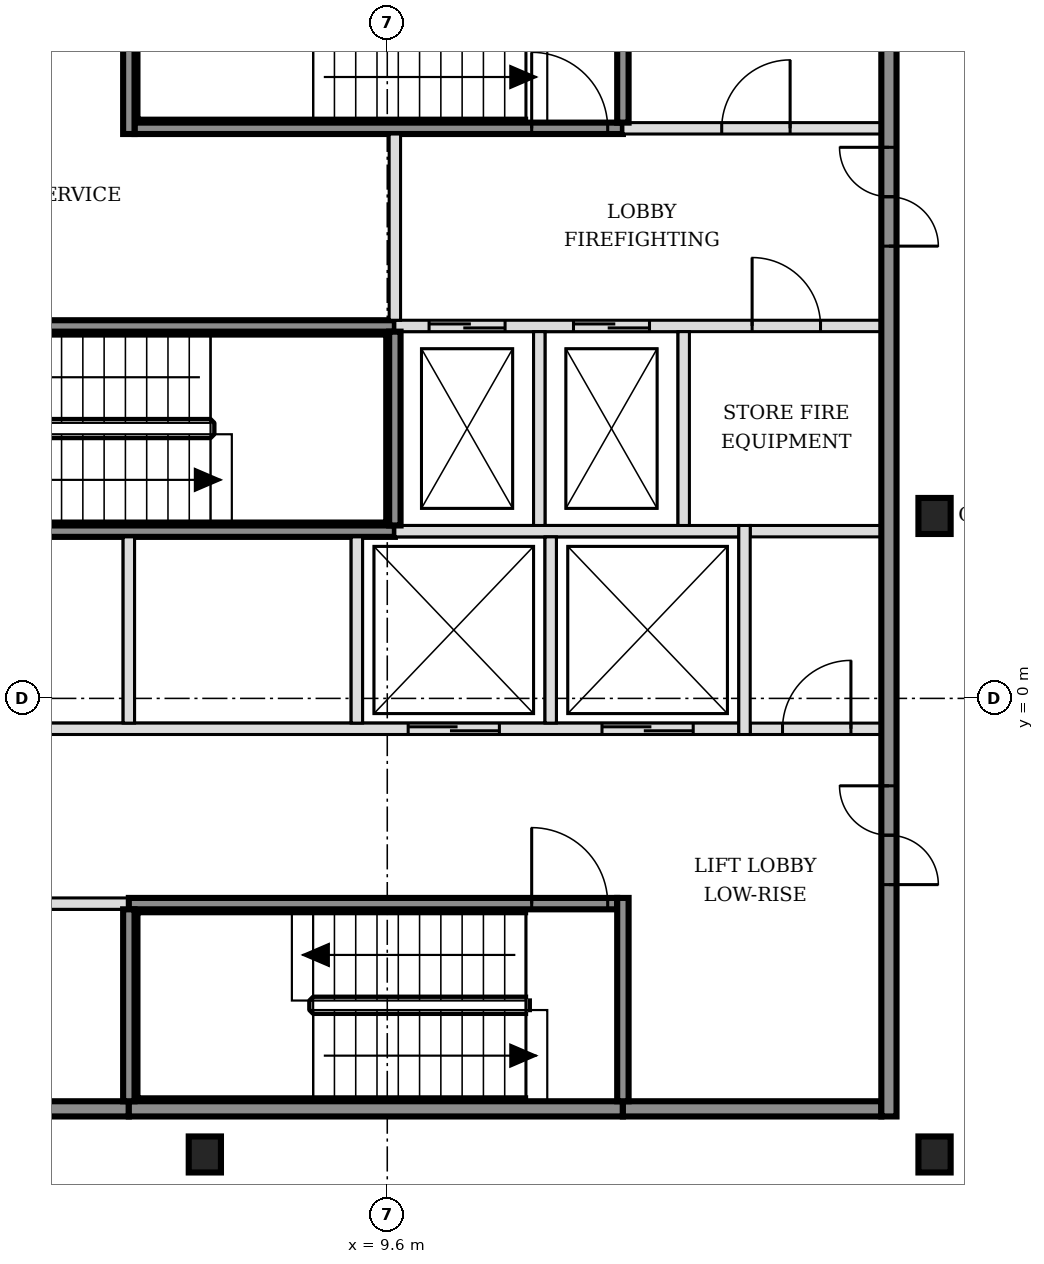
"""IFC4 building model, lengths in metres.
Left out: names, types, materials, properties, quantities, classifications, styles, units other than length and angle.
Written with IfcOpenShell. Run it as: python <this file> out.ifc"""

import sys

from ifc_helpers import new_model, si_unit, direction, frame, frame_2d, origin, origin_2d, place, context, subcontext, project, spatial, rectangle, i_section, extrude, element, fill, save


model = new_model("IFC4")
c1 = context("Model", 3, precision=1e-05, world=origin(), true_north=direction((0.0, 1.0)))
c2 = subcontext(c1, "Body", "Model", "MODEL_VIEW")
j1 = project(units=[si_unit("LENGTHUNIT", "METRE"), si_unit("PLANEANGLEUNIT", "RADIAN")], contexts=[c1])
p1 = place(None, origin())
s1 = spatial("IfcSite", under=j1, at=p1, CompositionType="ELEMENT")
p2 = place(p1, origin())
s2 = spatial("IfcBuilding", under=s1, at=p2, CompositionType="ELEMENT")
p3 = place(p2, frame((0.0, 0.0, 112.2)))
s3 = spatial("IfcBuildingStorey", under=s2, at=p3, CompositionType="ELEMENT", Elevation=112.2)
for number, where, z_axis, x_axis in (
    (1, (7.2, -6.0, -0.15), (0.0, 0.0, 1.0), (1.0, 0.0, 0.0)),
    (2, (16.8, -6.0, -0.15), (0.0, 0.0, 1.0), (1.0, 0.0, 0.0)),
    (3, (16.8, 2.4, -0.15), (0.0, 0.0, 1.0), (1.0, 0.0, 0.0)),
):
    element("IfcColumn", number, at=place(p3, frame(where, z_axis=z_axis, x_axis=x_axis)), inside=s3, PredefinedType="COLUMN", context=c2, shape_type="SweptSolid", body=[
        extrude(i_section(OverallWidth=0.424, OverallDepth=0.474, WebThickness=0.048, FlangeThickness=0.077, FilletRadius=0.015, at=origin_2d()), origin(), (0.0, 0.0, 1.0), 3.6),
    ])
p4 = place(p3, frame((-1.7, -5.4, 0.0), z_axis=(0.0, 0.0, 1.0), x_axis=(1.0, 0.0, 0.0)))
e4 = element("IfcWall", 4, at=p4, inside=s3, PredefinedType="SOLIDWALL", context=c2, shape_type="SweptSolid", body=[
    extrude(rectangle(XDim=7.9, YDim=0.2, at=frame_2d((3.95, 0.0))), origin(), (0.0, 0.0, 1.0), 3.45),
])
p5 = place(p3, frame((6.2, -5.4, 0.0), z_axis=(0.0, 0.0, 1.0), x_axis=(1.0, 0.0, 0.0)))
e5 = element("IfcWall", 5, at=p5, inside=s3, PredefinedType="SOLIDWALL", context=c2, shape_type="SweptSolid", body=[
    extrude(rectangle(XDim=6.5, YDim=0.2, at=frame_2d((3.25, 0.0))), origin(), (0.0, 0.0, 1.0), 3.45),
])
p6 = place(p3, frame((12.7, -5.4, 0.0), z_axis=(0.0, 0.0, 1.0), x_axis=(1.0, 0.0, 0.0)))
e6 = element("IfcWall", 6, at=p6, inside=s3, PredefinedType="SOLIDWALL", context=c2, shape_type="SweptSolid", body=[
    extrude(rectangle(XDim=3.4, YDim=0.2, at=frame_2d((1.7, 0.0))), origin(), (0.0, 0.0, 1.0), 3.45),
])
p7 = place(p3, frame((-1.7, -2.7, 0.0), z_axis=(0.0, 0.0, 1.0), x_axis=(1.0, 0.0, 0.0)))
e7 = element("IfcWall", 7, at=p7, inside=s3, PredefinedType="SOLIDWALL", context=c2, shape_type="SweptSolid", body=[
    extrude(rectangle(XDim=7.9, YDim=0.15, at=frame_2d((3.95, 0.0))), origin(), (0.0, 0.0, 1.0), 3.45),
])
p8 = place(p7, frame((0.6, 0.0, 0.0)))
e8 = element("IfcOpeningElement", 8, at=p8, cuts=e7, PredefinedType="OPENING", context=c2, shape_type="SweptSolid", body=[
    extrude(rectangle(XDim=1.1, YDim=2.1, at=frame_2d((0.55, 1.05))), frame((0.0, 0.085, 0.0), z_axis=(0.0, -1.0, 0.0), x_axis=(1.0, 0.0, 0.0)), (0.0, 0.0, 1.0), 0.17),
])
p9 = place(p7, frame((3.1, 0.0, 0.0)))
e9 = element("IfcOpeningElement", 9, at=p9, cuts=e7, PredefinedType="OPENING", context=c2, shape_type="SweptSolid", body=[
    extrude(rectangle(XDim=1.1, YDim=2.1, at=frame_2d((0.55, 1.05))), frame((0.0, 0.085, 0.0), z_axis=(0.0, -1.0, 0.0), x_axis=(1.0, 0.0, 0.0)), (0.0, 0.0, 1.0), 0.17),
])
p10 = place(p3, frame((6.2, -2.7, 0.0), z_axis=(0.0, 0.0, 1.0), x_axis=(1.0, 0.0, 0.0)))
e10 = element("IfcWall", 10, at=p10, inside=s3, PredefinedType="SOLIDWALL", context=c2, shape_type="SweptSolid", body=[
    extrude(rectangle(XDim=6.425, YDim=0.15, at=frame_2d((3.212, 0.0))), origin(), (0.0, 0.0, 1.0), 3.45),
])
p11 = place(p10, frame((5.3, 0.0, 0.0)))
e11 = element("IfcOpeningElement", 11, at=p11, cuts=e10, PredefinedType="OPENING", context=c2, shape_type="SweptSolid", body=[
    extrude(rectangle(XDim=1.0, YDim=2.1, at=frame_2d((0.5, 1.05))), frame((0.0, 0.085, 0.0), z_axis=(0.0, -1.0, 0.0), x_axis=(1.0, 0.0, 0.0)), (0.0, 0.0, 1.0), 0.17),
])
p12 = place(p3, frame((-1.7, -0.4, 0.0), z_axis=(0.0, 0.0, 1.0), x_axis=(1.0, 0.0, 0.0)))
e12 = element("IfcWall", 12, at=p12, inside=s3, PredefinedType="SOLIDWALL", context=c2, shape_type="SweptSolid", body=[
    extrude(rectangle(XDim=15.925, YDim=0.15, at=frame_2d((7.962, 0.0))), origin(), (0.0, 0.0, 1.0), 3.45),
])
p13 = place(p12, frame((0.6, 0.0, 0.0)))
e13 = element("IfcOpeningElement", 13, at=p13, cuts=e12, PredefinedType="OPENING", context=c2, shape_type="SweptSolid", body=[
    extrude(rectangle(XDim=1.1, YDim=2.1, at=frame_2d((0.55, 1.05))), frame((0.0, 0.085, 0.0), z_axis=(0.0, -1.0, 0.0), x_axis=(1.0, 0.0, 0.0)), (0.0, 0.0, 1.0), 0.17),
])
p14 = place(p12, frame((3.1, 0.0, 0.0)))
e14 = element("IfcOpeningElement", 14, at=p14, cuts=e12, PredefinedType="OPENING", context=c2, shape_type="SweptSolid", body=[
    extrude(rectangle(XDim=1.1, YDim=2.1, at=frame_2d((0.55, 1.05))), frame((0.0, 0.085, 0.0), z_axis=(0.0, -1.0, 0.0), x_axis=(1.0, 0.0, 0.0)), (0.0, 0.0, 1.0), 0.17),
])
p15 = place(p12, frame((11.575, 0.0, 0.0)))
e15 = element("IfcOpeningElement", 15, at=p15, cuts=e12, PredefinedType="OPENING", context=c2, shape_type="SweptSolid", body=[
    extrude(rectangle(XDim=1.2, YDim=2.1, at=frame_2d((0.6, 1.05))), frame((0.0, 0.085, 0.0), z_axis=(0.0, -1.0, 0.0), x_axis=(1.0, 0.0, 0.0)), (0.0, 0.0, 1.0), 0.17),
])
p16 = place(p12, frame((14.125, 0.0, 0.0)))
e16 = element("IfcOpeningElement", 16, at=p16, cuts=e12, PredefinedType="OPENING", context=c2, shape_type="SweptSolid", body=[
    extrude(rectangle(XDim=1.2, YDim=2.1, at=frame_2d((0.6, 1.05))), frame((0.0, 0.085, 0.0), z_axis=(0.0, -1.0, 0.0), x_axis=(1.0, 0.0, 0.0)), (0.0, 0.0, 1.0), 0.17),
])
p17 = place(p3, frame((14.375, -0.4, 0.0), z_axis=(0.0, 0.0, 1.0), x_axis=(1.0, 0.0, 0.0)))
e17 = element("IfcWall", 17, at=p17, inside=s3, PredefinedType="PARTITIONING", context=c2, shape_type="SweptSolid", body=[
    extrude(rectangle(XDim=1.725, YDim=0.15, at=frame_2d((0.863, 0.0))), origin(), (0.0, 0.0, 1.0), 3.45),
])
p18 = place(p17, frame((0.425, 0.0, 0.0)))
e18 = element("IfcOpeningElement", 18, at=p18, cuts=e17, PredefinedType="OPENING", context=c2, shape_type="SweptSolid", body=[
    extrude(rectangle(XDim=0.9, YDim=2.1, at=frame_2d((0.45, 1.05))), frame((0.0, 0.085, 0.0), z_axis=(0.0, -1.0, 0.0), x_axis=(1.0, 0.0, 0.0)), (0.0, 0.0, 1.0), 0.17),
])
p19 = place(p3, frame((3.2, 2.2, 0.0), z_axis=(0.0, 0.0, 1.0), x_axis=(1.0, 0.0, 0.0)))
e19 = element("IfcWall", 19, at=p19, inside=s3, PredefinedType="SOLIDWALL", context=c2, shape_type="SweptSolid", body=[
    extrude(rectangle(XDim=6.5, YDim=0.15, at=frame_2d((3.25, 0.0))), origin(), (0.0, 0.0, 1.0), 3.45),
])
p20 = place(p3, frame((9.7, 2.2, 0.0), z_axis=(0.0, 0.0, 1.0), x_axis=(1.0, 0.0, 0.0)))
e20 = element("IfcWall", 20, at=p20, inside=s3, PredefinedType="SOLIDWALL", context=c2, shape_type="SweptSolid", body=[
    extrude(rectangle(XDim=4.525, YDim=0.15, at=frame_2d((2.263, 0.0))), origin(), (0.0, 0.0, 1.0), 3.45),
])
p21 = place(p3, frame((14.375, 2.2, 0.0), z_axis=(0.0, 0.0, 1.0), x_axis=(1.0, 0.0, 0.0)))
e21 = element("IfcWall", 21, at=p21, inside=s3, PredefinedType="PARTITIONING", context=c2, shape_type="SweptSolid", body=[
    extrude(rectangle(XDim=1.725, YDim=0.15, at=frame_2d((0.863, 0.0))), origin(), (0.0, 0.0, 1.0), 3.45),
])
p22 = place(p3, frame((3.275, 4.9, 0.0), z_axis=(0.0, 0.0, 1.0), x_axis=(1.0, 0.0, 0.0)))
e22 = element("IfcWall", 22, at=p22, inside=s3, PredefinedType="SOLIDWALL", context=c2, shape_type="SweptSolid", body=[
    extrude(rectangle(XDim=6.425, YDim=0.15, at=frame_2d((3.212, 0.0))), origin(), (0.0, 0.0, 1.0), 3.45),
])
p23 = place(p22, frame((0.1, 0.0, 0.0)))
e23 = element("IfcOpeningElement", 23, at=p23, cuts=e22, PredefinedType="OPENING", context=c2, shape_type="SweptSolid", body=[
    extrude(rectangle(XDim=1.0, YDim=2.1, at=frame_2d((0.5, 1.05))), frame((0.0, 0.085, 0.0), z_axis=(0.0, -1.0, 0.0), x_axis=(1.0, 0.0, 0.0)), (0.0, 0.0, 1.0), 0.17),
])
p24 = place(p3, frame((9.7, 4.9, 0.0), z_axis=(0.0, 0.0, 1.0), x_axis=(1.0, 0.0, 0.0)))
e24 = element("IfcWall", 24, at=p24, inside=s3, PredefinedType="SOLIDWALL", context=c2, shape_type="SweptSolid", body=[
    extrude(rectangle(XDim=6.4, YDim=0.15, at=frame_2d((3.2, 0.0))), origin(), (0.0, 0.0, 1.0), 3.45),
])
p25 = place(p24, frame((0.45, 0.0, 0.0)))
e25 = element("IfcOpeningElement", 25, at=p25, cuts=e24, PredefinedType="OPENING", context=c2, shape_type="SweptSolid", body=[
    extrude(rectangle(XDim=1.0, YDim=2.1, at=frame_2d((0.5, 1.05))), frame((0.0, 0.085, 0.0), z_axis=(0.0, -1.0, 0.0), x_axis=(1.0, 0.0, 0.0)), (0.0, 0.0, 1.0), 0.17),
])
p26 = place(p24, frame((2.35, 0.0, 0.0)))
e26 = element("IfcOpeningElement", 26, at=p26, cuts=e24, PredefinedType="OPENING", context=c2, shape_type="SweptSolid", body=[
    extrude(rectangle(XDim=1.0, YDim=2.1, at=frame_2d((0.5, 1.05))), frame((0.0, 0.085, 0.0), z_axis=(0.0, -1.0, 0.0), x_axis=(1.0, 0.0, 0.0)), (0.0, 0.0, 1.0), 0.17),
])
p27 = place(p24, frame((4.7, 0.0, 0.0)))
e27 = element("IfcOpeningElement", 27, at=p27, cuts=e24, PredefinedType="OPENING", context=c2, shape_type="SweptSolid", body=[
    extrude(rectangle(XDim=0.9, YDim=2.1, at=frame_2d((0.45, 1.05))), frame((0.0, 0.085, 0.0), z_axis=(0.0, -1.0, 0.0), x_axis=(1.0, 0.0, 0.0)), (0.0, 0.0, 1.0), 0.17),
])
p28 = place(p3, frame((6.275, 7.5, 0.0), z_axis=(0.0, 0.0, 1.0), x_axis=(1.0, 0.0, 0.0)))
e28 = element("IfcWall", 28, at=p28, inside=s3, PredefinedType="SOLIDWALL", context=c2, shape_type="SweptSolid", body=[
    extrude(rectangle(XDim=6.425, YDim=0.15, at=frame_2d((3.212, 0.0))), origin(), (0.0, 0.0, 1.0), 3.45),
])
p29 = place(p28, frame((5.225, 0.0, 0.0)))
e29 = element("IfcOpeningElement", 29, at=p29, cuts=e28, PredefinedType="OPENING", context=c2, shape_type="SweptSolid", body=[
    extrude(rectangle(XDim=1.0, YDim=2.1, at=frame_2d((0.5, 1.05))), frame((0.0, 0.085, 0.0), z_axis=(0.0, -1.0, 0.0), x_axis=(1.0, 0.0, 0.0)), (0.0, 0.0, 1.0), 0.17),
])
p30 = place(p3, frame((12.7, 7.5, 0.0), z_axis=(0.0, 0.0, 1.0), x_axis=(1.0, 0.0, 0.0)))
e30 = element("IfcWall", 30, at=p30, inside=s3, PredefinedType="SOLIDWALL", context=c2, shape_type="SweptSolid", body=[
    extrude(rectangle(XDim=3.4, YDim=0.15, at=frame_2d((1.7, 0.0))), origin(), (0.0, 0.0, 1.0), 3.45),
])
p31 = place(p30, frame((1.3, 0.0, 0.0)))
e31 = element("IfcOpeningElement", 31, at=p31, cuts=e30, PredefinedType="OPENING", context=c2, shape_type="SweptSolid", body=[
    extrude(rectangle(XDim=0.9, YDim=2.1, at=frame_2d((0.45, 1.05))), frame((0.0, 0.085, 0.0), z_axis=(0.0, -1.0, 0.0), x_axis=(1.0, 0.0, 0.0)), (0.0, 0.0, 1.0), 0.17),
])
p32 = place(p3, frame((6.2, -5.3, 0.0), z_axis=(0.0, 0.0, 1.0), x_axis=(0.0, 1.0, 0.0)))
e32 = element("IfcWall", 32, at=p32, inside=s3, PredefinedType="SOLIDWALL", context=c2, shape_type="SweptSolid", body=[
    extrude(rectangle(XDim=2.525, YDim=0.15, at=frame_2d((1.263, 0.0))), origin(), (0.0, 0.0, 1.0), 3.45),
])
p33 = place(p3, frame((6.2, -0.325, 0.0), z_axis=(0.0, 0.0, 1.0), x_axis=(0.0, 1.0, 0.0)))
e33 = element("IfcWall", 33, at=p33, inside=s3, PredefinedType="SOLIDWALL", context=c2, shape_type="SweptSolid", body=[
    extrude(rectangle(XDim=2.45, YDim=0.15, at=frame_2d((1.225, 0.0))), origin(), (0.0, 0.0, 1.0), 3.45),
])
p34 = place(p3, frame((6.2, 7.425, 0.0), z_axis=(0.0, 0.0, 1.0), x_axis=(0.0, 1.0, 0.0)))
e34 = element("IfcWall", 34, at=p34, inside=s3, PredefinedType="SOLIDWALL", context=c2, shape_type="SweptSolid", body=[
    extrude(rectangle(XDim=2.675, YDim=0.15, at=frame_2d((1.337, 0.0))), origin(), (0.0, 0.0, 1.0), 3.45),
])
p35 = place(p3, frame((9.2, -0.325, 0.0), z_axis=(0.0, 0.0, 1.0), x_axis=(0.0, 1.0, 0.0)))
e35 = element("IfcWall", 35, at=p35, inside=s3, PredefinedType="SOLIDWALL", context=c2, shape_type="SweptSolid", body=[
    extrude(rectangle(XDim=2.45, YDim=0.15, at=frame_2d((1.225, 0.0))), origin(), (0.0, 0.0, 1.0), 3.45),
])
p36 = place(p3, frame((9.7, 2.275, 0.0), z_axis=(0.0, 0.0, 1.0), x_axis=(0.0, 1.0, 0.0)))
e36 = element("IfcWall", 36, at=p36, inside=s3, PredefinedType="SOLIDWALL", context=c2, shape_type="SweptSolid", body=[
    extrude(rectangle(XDim=2.55, YDim=0.15, at=frame_2d((1.275, 0.0))), origin(), (0.0, 0.0, 1.0), 3.45),
])
p37 = place(p3, frame((9.7, 4.975, 0.0), z_axis=(0.0, 0.0, 1.0), x_axis=(0.0, 1.0, 0.0)))
e37 = element("IfcWall", 37, at=p37, inside=s3, PredefinedType="SOLIDWALL", context=c2, shape_type="SweptSolid", body=[
    extrude(rectangle(XDim=2.45, YDim=0.15, at=frame_2d((1.225, 0.0))), origin(), (0.0, 0.0, 1.0), 3.45),
])
p38 = place(p3, frame((11.6, 2.275, 0.0), z_axis=(0.0, 0.0, 1.0), x_axis=(0.0, 1.0, 0.0)))
e38 = element("IfcWall", 38, at=p38, inside=s3, PredefinedType="SOLIDWALL", context=c2, shape_type="SweptSolid", body=[
    extrude(rectangle(XDim=2.55, YDim=0.15, at=frame_2d((1.275, 0.0))), origin(), (0.0, 0.0, 1.0), 3.45),
])
p39 = place(p3, frame((11.75, -0.325, 0.0), z_axis=(0.0, 0.0, 1.0), x_axis=(0.0, 1.0, 0.0)))
e39 = element("IfcWall", 39, at=p39, inside=s3, PredefinedType="SOLIDWALL", context=c2, shape_type="SweptSolid", body=[
    extrude(rectangle(XDim=2.45, YDim=0.15, at=frame_2d((1.225, 0.0))), origin(), (0.0, 0.0, 1.0), 3.45),
])
p40 = place(p3, frame((12.7, -5.3, 0.0), z_axis=(0.0, 0.0, 1.0), x_axis=(0.0, 1.0, 0.0)))
e40 = element("IfcWall", 40, at=p40, inside=s3, PredefinedType="SOLIDWALL", context=c2, shape_type="SweptSolid", body=[
    extrude(rectangle(XDim=2.675, YDim=0.15, at=frame_2d((1.337, 0.0))), origin(), (0.0, 0.0, 1.0), 3.45),
])
p41 = place(p3, frame((12.7, 7.575, 0.0), z_axis=(0.0, 0.0, 1.0), x_axis=(0.0, 1.0, 0.0)))
e41 = element("IfcWall", 41, at=p41, inside=s3, PredefinedType="SOLIDWALL", context=c2, shape_type="SweptSolid", body=[
    extrude(rectangle(XDim=2.525, YDim=0.15, at=frame_2d((1.263, 0.0))), origin(), (0.0, 0.0, 1.0), 3.45),
])
p42 = place(p3, frame((13.5, 2.275, 0.0), z_axis=(0.0, 0.0, 1.0), x_axis=(0.0, 1.0, 0.0)))
e42 = element("IfcWall", 42, at=p42, inside=s3, PredefinedType="SOLIDWALL", context=c2, shape_type="SweptSolid", body=[
    extrude(rectangle(XDim=2.55, YDim=0.15, at=frame_2d((1.275, 0.0))), origin(), (0.0, 0.0, 1.0), 3.45),
])
p43 = place(p3, frame((14.3, -0.475, 0.0), z_axis=(0.0, 0.0, 1.0), x_axis=(0.0, 1.0, 0.0)))
e43 = element("IfcWall", 43, at=p43, inside=s3, PredefinedType="SOLIDWALL", context=c2, shape_type="SweptSolid", body=[
    extrude(rectangle(XDim=2.75, YDim=0.15, at=frame_2d((1.375, 0.0))), origin(), (0.0, 0.0, 1.0), 3.45),
])
p44 = place(p3, frame((16.2, -5.5, 0.0), z_axis=(0.0, 0.0, 1.0), x_axis=(0.0, 1.0, 0.0)))
e44 = element("IfcWall", 44, at=p44, inside=s3, PredefinedType="SOLIDWALL", context=c2, shape_type="SweptSolid", body=[
    extrude(rectangle(XDim=15.8, YDim=0.2, at=frame_2d((7.9, 0.0))), origin(), (0.0, 0.0, 1.0), 3.45),
])
p45 = place(p44, frame((3.05, 0.0, 0.0)))
e45 = element("IfcOpeningElement", 45, at=p45, cuts=e44, PredefinedType="OPENING", context=c2, shape_type="SweptSolid", body=[
    extrude(rectangle(XDim=1.3, YDim=2.1, at=frame_2d((0.65, 1.05))), frame((0.0, 0.11, 0.0), z_axis=(0.0, -1.0, 0.0), x_axis=(1.0, 0.0, 0.0)), (0.0, 0.0, 1.0), 0.22),
])
p46 = place(p44, frame((11.45, 0.0, 0.0)))
e46 = element("IfcOpeningElement", 46, at=p46, cuts=e44, PredefinedType="OPENING", context=c2, shape_type="SweptSolid", body=[
    extrude(rectangle(XDim=1.3, YDim=2.1, at=frame_2d((0.65, 1.05))), frame((0.0, 0.11, 0.0), z_axis=(0.0, -1.0, 0.0), x_axis=(1.0, 0.0, 0.0)), (0.0, 0.0, 1.0), 0.22),
])
p47 = place(p15, origin())
e47 = element("IfcDoor", 47, at=p47, inside=s3, OperationType="DOUBLE_DOOR_SLIDING", PredefinedType="DOOR", context=c2, shape_type="SweptSolid", body=[
    extrude(rectangle(XDim=1.2, YDim=2.1, at=frame_2d((0.6, 1.05))), frame((0.0, 0.025, 0.0), z_axis=(0.0, -1.0, 0.0), x_axis=(1.0, 0.0, 0.0)), (0.0, 0.0, 1.0), 0.05),
])
fill(e15, e47)
p48 = place(p16, origin())
e48 = element("IfcDoor", 48, at=p48, inside=s3, OperationType="DOUBLE_DOOR_SLIDING", PredefinedType="DOOR", context=c2, shape_type="SweptSolid", body=[
    extrude(rectangle(XDim=1.2, YDim=2.1, at=frame_2d((0.6, 1.05))), frame((0.0, 0.025, 0.0), z_axis=(0.0, -1.0, 0.0), x_axis=(1.0, 0.0, 0.0)), (0.0, 0.0, 1.0), 0.05),
])
fill(e16, e48)
p49 = place(p25, origin())
e49 = element("IfcDoor", 49, at=p49, inside=s3, OperationType="DOUBLE_DOOR_SLIDING", PredefinedType="DOOR", context=c2, shape_type="SweptSolid", body=[
    extrude(rectangle(XDim=1.0, YDim=2.1, at=frame_2d((0.5, 1.05))), frame((0.0, 0.025, 0.0), z_axis=(0.0, -1.0, 0.0), x_axis=(1.0, 0.0, 0.0)), (0.0, 0.0, 1.0), 0.05),
])
fill(e25, e49)
p50 = place(p26, origin())
e50 = element("IfcDoor", 50, at=p50, inside=s3, OperationType="DOUBLE_DOOR_SLIDING", PredefinedType="DOOR", context=c2, shape_type="SweptSolid", body=[
    extrude(rectangle(XDim=1.0, YDim=2.1, at=frame_2d((0.5, 1.05))), frame((0.0, 0.025, 0.0), z_axis=(0.0, -1.0, 0.0), x_axis=(1.0, 0.0, 0.0)), (0.0, 0.0, 1.0), 0.05),
])
fill(e26, e50)
p51 = place(p11, origin())
e51 = element("IfcDoor", 51, at=p51, inside=s3, OperationType="SINGLE_SWING_LEFT", PredefinedType="DOOR", context=c2, shape_type="SweptSolid", body=[
    extrude(rectangle(XDim=1.0, YDim=2.1, at=frame_2d((0.5, 1.05))), frame((0.0, 0.025, 0.0), z_axis=(0.0, -1.0, 0.0), x_axis=(1.0, 0.0, 0.0)), (0.0, 0.0, 1.0), 0.05),
])
fill(e11, e51)
p52 = place(p29, origin())
e52 = element("IfcDoor", 52, at=p52, inside=s3, OperationType="SINGLE_SWING_LEFT", PredefinedType="DOOR", context=c2, shape_type="SweptSolid", body=[
    extrude(rectangle(XDim=1.0, YDim=2.1, at=frame_2d((0.5, 1.05))), frame((0.0, 0.025, 0.0), z_axis=(0.0, -1.0, 0.0), x_axis=(1.0, 0.0, 0.0)), (0.0, 0.0, 1.0), 0.05),
])
fill(e29, e52)
p53 = place(p45, origin())
e53 = element("IfcDoor", 53, at=p53, inside=s3, OperationType="DOUBLE_DOOR_SINGLE_SWING", PredefinedType="DOOR", context=c2, shape_type="SweptSolid", body=[
    extrude(rectangle(XDim=1.3, YDim=2.1, at=frame_2d((0.65, 1.05))), frame((0.0, 0.025, 0.0), z_axis=(0.0, -1.0, 0.0), x_axis=(1.0, 0.0, 0.0)), (0.0, 0.0, 1.0), 0.05),
])
fill(e45, e53)
p54 = place(p46, origin())
e54 = element("IfcDoor", 54, at=p54, inside=s3, OperationType="DOUBLE_DOOR_SINGLE_SWING", PredefinedType="DOOR", context=c2, shape_type="SweptSolid", body=[
    extrude(rectangle(XDim=1.3, YDim=2.1, at=frame_2d((0.65, 1.05))), frame((0.0, 0.025, 0.0), z_axis=(0.0, -1.0, 0.0), x_axis=(1.0, 0.0, 0.0)), (0.0, 0.0, 1.0), 0.05),
])
fill(e46, e54)
p55 = place(p18, origin())
e55 = element("IfcDoor", 55, at=p55, inside=s3, OperationType="SINGLE_SWING_RIGHT", PredefinedType="DOOR", context=c2, shape_type="SweptSolid", body=[
    extrude(rectangle(XDim=0.9, YDim=2.1, at=frame_2d((0.45, 1.05))), frame((0.0, 0.025, 0.0), z_axis=(0.0, -1.0, 0.0), x_axis=(1.0, 0.0, 0.0)), (0.0, 0.0, 1.0), 0.05),
])
fill(e18, e55)
p56 = place(p27, origin())
e56 = element("IfcDoor", 56, at=p56, inside=s3, OperationType="SINGLE_SWING_LEFT", PredefinedType="DOOR", context=c2, shape_type="SweptSolid", body=[
    extrude(rectangle(XDim=0.9, YDim=2.1, at=frame_2d((0.45, 1.05))), frame((0.0, 0.025, 0.0), z_axis=(0.0, -1.0, 0.0), x_axis=(1.0, 0.0, 0.0)), (0.0, 0.0, 1.0), 0.05),
])
fill(e27, e56)
p57 = place(p31, origin())
e57 = element("IfcDoor", 57, at=p57, inside=s3, OperationType="SINGLE_SWING_RIGHT", PredefinedType="DOOR", context=c2, shape_type="SweptSolid", body=[
    extrude(rectangle(XDim=0.9, YDim=2.1, at=frame_2d((0.45, 1.05))), frame((0.0, 0.025, 0.0), z_axis=(0.0, -1.0, 0.0), x_axis=(1.0, 0.0, 0.0)), (0.0, 0.0, 1.0), 0.05),
])
fill(e31, e57)
save(model, sys.argv[1])
